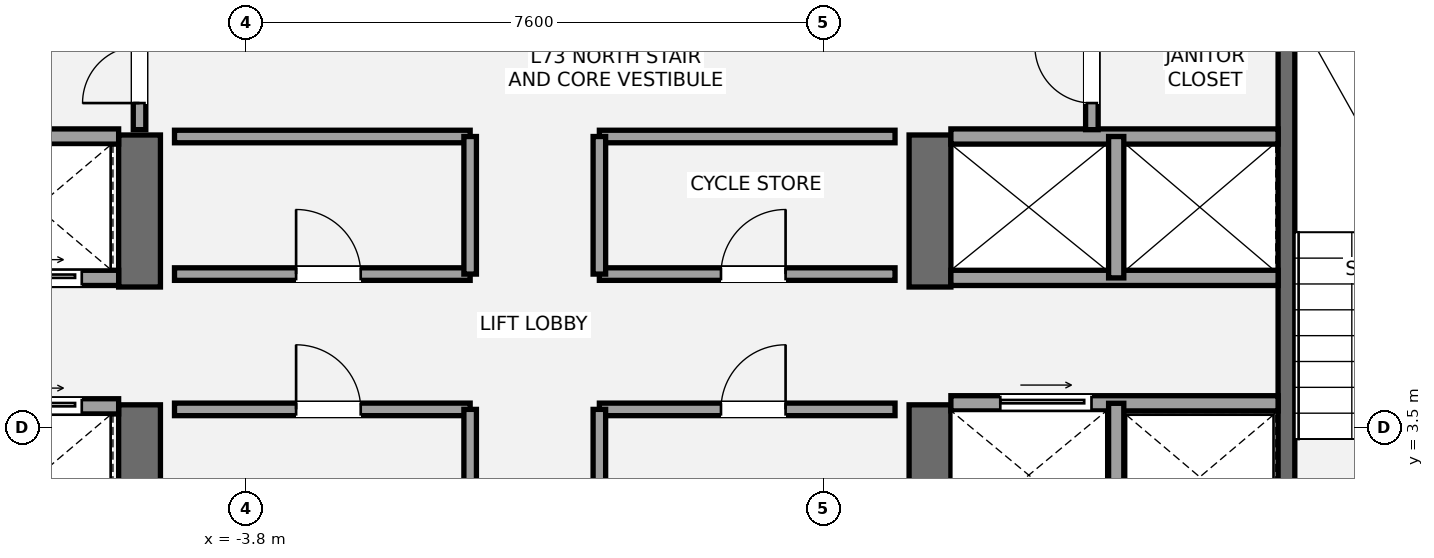
"""IFC4 building model, lengths in metres.
Left out: names, types, materials, properties, quantities, classifications, styles, units other than length and angle.
Written with IfcOpenShell. Run it as: python <this file> out.ifc"""

import sys

from ifc_helpers import new_model, si_unit, direction, frame, frame_2d, origin, place, context, subcontext, project, spatial, rectangle, extrude, element, fill, save


model = new_model("IFC4")
c1 = context("Model", 3, precision=1e-05, world=origin(), true_north=direction((0.0, 1.0)))
c2 = subcontext(c1, "Body", "Model", "MODEL_VIEW")
j1 = project(units=[si_unit("LENGTHUNIT", "METRE"), si_unit("PLANEANGLEUNIT", "RADIAN")], contexts=[c1])
p1 = place(None, origin())
s1 = spatial("IfcSite", under=j1, at=p1, CompositionType="ELEMENT")
p2 = place(p1, origin())
s2 = spatial("IfcBuilding", under=s1, at=p2, CompositionType="ELEMENT")
p3 = place(p2, frame((0.0, 0.0, 257.25)))
s3 = spatial("IfcBuildingStorey", under=s2, at=p3, CompositionType="ELEMENT", Elevation=257.25)
p4 = place(p3, frame((-5.2, 1.3, 0.0), z_axis=(0.0, 0.0, 1.0), x_axis=(0.0, 1.0, 0.0)))
e1 = element("IfcWall", 1, at=p4, inside=s3, PredefinedType="SHEAR", context=c2, shape_type="SweptSolid", body=[
    extrude(rectangle(XDim=2.5, YDim=0.55, at=frame_2d((1.25, 0.0))), origin(), (0.0, 0.0, 1.0), 3.15),
])
p5 = place(p3, frame((-5.2, 5.35, 0.0), z_axis=(0.0, 0.0, 1.0), x_axis=(0.0, 1.0, 0.0)))
e2 = element("IfcWall", 2, at=p5, inside=s3, PredefinedType="SHEAR", context=c2, shape_type="SweptSolid", body=[
    extrude(rectangle(XDim=2.0, YDim=0.55, at=frame_2d((1.0, 0.0))), origin(), (0.0, 0.0, 1.0), 3.15),
])
p6 = place(p3, frame((5.2, 1.3, 0.0), z_axis=(0.0, 0.0, 1.0), x_axis=(0.0, 1.0, 0.0)))
e3 = element("IfcWall", 3, at=p6, inside=s3, PredefinedType="SHEAR", context=c2, shape_type="SweptSolid", body=[
    extrude(rectangle(XDim=2.5, YDim=0.55, at=frame_2d((1.25, 0.0))), origin(), (0.0, 0.0, 1.0), 3.15),
])
p7 = place(p3, frame((5.2, 5.35, 0.0), z_axis=(0.0, 0.0, 1.0), x_axis=(0.0, 1.0, 0.0)))
e4 = element("IfcWall", 4, at=p7, inside=s3, PredefinedType="SHEAR", context=c2, shape_type="SweptSolid", body=[
    extrude(rectangle(XDim=2.0, YDim=0.55, at=frame_2d((1.0, 0.0))), origin(), (0.0, 0.0, 1.0), 3.15),
])
p8 = place(p3, frame((9.89, 1.85, 0.0), z_axis=(0.0, 0.0, 1.0), x_axis=(0.0, 1.0, 0.0)))
e5 = element("IfcWall", 5, at=p8, inside=s3, PredefinedType="SHEAR", context=c2, shape_type="SweptSolid", body=[
    extrude(rectangle(XDim=7.15, YDim=0.22, at=frame_2d((3.575, 0.0))), origin(), (0.0, 0.0, 1.0), 3.15),
])
p9 = place(p3, frame((-9.78, 3.78, 0.0), z_axis=(0.0, 0.0, 1.0), x_axis=(1.0, 0.0, 0.0)))
e6 = element("IfcWall", 6, at=p9, inside=s3, PredefinedType="SOLIDWALL", context=c2, shape_type="SweptSolid", body=[
    extrude(rectangle(XDim=4.305, YDim=0.2, at=frame_2d((2.152, 0.0))), origin(), (0.0, 0.0, 1.0), 2.93),
])
p10 = place(p9, frame((2.72, 0.0, 0.0)))
e7 = element("IfcOpeningElement", 7, at=p10, cuts=e6, PredefinedType="OPENING", context=c2, shape_type="SweptSolid", body=[
    extrude(rectangle(XDim=1.1, YDim=2.2, at=frame_2d((0.55, 1.1))), frame((0.0, 0.11, 0.0), z_axis=(0.0, -1.0, 0.0), x_axis=(1.0, 0.0, 0.0)), (0.0, 0.0, 1.0), 0.22),
])
p11 = place(p3, frame((-9.78, 5.47, 0.0), z_axis=(0.0, 0.0, 1.0), x_axis=(1.0, 0.0, 0.0)))
e8 = element("IfcWall", 8, at=p11, inside=s3, PredefinedType="SOLIDWALL", context=c2, shape_type="SweptSolid", body=[
    extrude(rectangle(XDim=4.305, YDim=0.2, at=frame_2d((2.152, 0.0))), origin(), (0.0, 0.0, 1.0), 2.93),
])
p12 = place(p11, frame((0.55, 0.0, 0.0)))
e9 = element("IfcOpeningElement", 9, at=p12, cuts=e8, PredefinedType="OPENING", context=c2, shape_type="SweptSolid", body=[
    extrude(rectangle(XDim=1.1, YDim=2.2, at=frame_2d((0.55, 1.1))), frame((0.0, 0.11, 0.0), z_axis=(0.0, -1.0, 0.0), x_axis=(1.0, 0.0, 0.0)), (0.0, 0.0, 1.0), 0.22),
])
p13 = place(p11, frame((2.72, 0.0, 0.0)))
e10 = element("IfcOpeningElement", 10, at=p13, cuts=e8, PredefinedType="OPENING", context=c2, shape_type="SweptSolid", body=[
    extrude(rectangle(XDim=1.1, YDim=2.2, at=frame_2d((0.55, 1.1))), frame((0.0, 0.11, 0.0), z_axis=(0.0, -1.0, 0.0), x_axis=(1.0, 0.0, 0.0)), (0.0, 0.0, 1.0), 0.22),
])
p14 = place(p3, frame((-9.78, 7.33, 0.0), z_axis=(0.0, 0.0, 1.0), x_axis=(1.0, 0.0, 0.0)))
e11 = element("IfcWall", 11, at=p14, inside=s3, PredefinedType="SOLIDWALL", context=c2, shape_type="SweptSolid", body=[
    extrude(rectangle(XDim=4.305, YDim=0.2, at=frame_2d((2.152, 0.0))), origin(), (0.0, 0.0, 1.0), 2.93),
])
p15 = place(p3, frame((5.475, 3.82, 0.0), z_axis=(0.0, 0.0, 1.0), x_axis=(1.0, 0.0, 0.0)))
e12 = element("IfcWall", 12, at=p15, inside=s3, PredefinedType="SOLIDWALL", context=c2, shape_type="SweptSolid", body=[
    extrude(rectangle(XDim=4.305, YDim=0.2, at=frame_2d((2.152, 0.0))), origin(), (0.0, 0.0, 1.0), 2.93),
])
p16 = place(p15, frame((0.65, 0.0, 0.0)))
e13 = element("IfcOpeningElement", 13, at=p16, cuts=e12, PredefinedType="OPENING", context=c2, shape_type="SweptSolid", body=[
    extrude(rectangle(XDim=1.2, YDim=2.2, at=frame_2d((0.6, 1.1))), frame((0.0, 0.11, 0.0), z_axis=(0.0, -1.0, 0.0), x_axis=(1.0, 0.0, 0.0)), (0.0, 0.0, 1.0), 0.22),
])
p17 = place(p3, frame((7.65, 1.85, 0.0), z_axis=(0.0, 0.0, 1.0), x_axis=(0.0, 1.0, 0.0)))
e14 = element("IfcWall", 14, at=p17, inside=s3, PredefinedType="SOLIDWALL", context=c2, shape_type="SweptSolid", body=[
    extrude(rectangle(XDim=1.97, YDim=0.2, at=frame_2d((0.985, 0.0))), origin(), (0.0, 0.0, 1.0), 2.93),
])
for number, where, z_axis, x_axis in (
    (15, (5.475, 5.47, 0.0), (0.0, 0.0, 1.0), (1.0, 0.0, 0.0)),
    (16, (5.475, 7.33, 0.0), (0.0, 0.0, 1.0), (1.0, 0.0, 0.0)),
):
    element("IfcWall", number, at=place(p3, frame(where, z_axis=z_axis, x_axis=x_axis)), inside=s3, PredefinedType="SOLIDWALL", context=c2, shape_type="SweptSolid", body=[
        extrude(rectangle(XDim=4.305, YDim=0.2, at=frame_2d((2.152, 0.0))), origin(), (0.0, 0.0, 1.0), 2.93),
    ])
p18 = place(p3, frame((7.65, 5.47, 0.0), z_axis=(0.0, 0.0, 1.0), x_axis=(0.0, 1.0, 0.0)))
e17 = element("IfcWall", 17, at=p18, inside=s3, PredefinedType="SOLIDWALL", context=c2, shape_type="SweptSolid", body=[
    extrude(rectangle(XDim=1.86, YDim=0.2, at=frame_2d((0.93, 0.0))), origin(), (0.0, 0.0, 1.0), 2.93),
])
p19 = place(p3, frame((-4.74, 3.74, 0.0), z_axis=(0.0, 0.0, 1.0), x_axis=(1.0, 0.0, 0.0)))
e18 = element("IfcWall", 18, at=p19, inside=s3, PredefinedType="PARTITIONING", context=c2, shape_type="SweptSolid", body=[
    extrude(rectangle(XDim=3.89, YDim=0.165, at=frame_2d((1.945, 0.0))), origin(), (0.0, 0.0, 1.0), 2.93),
])
p20 = place(p19, frame((1.6, 0.0, 0.0)))
e19 = element("IfcOpeningElement", 19, at=p20, cuts=e18, PredefinedType="OPENING", context=c2, shape_type="SweptSolid", body=[
    extrude(rectangle(XDim=0.85, YDim=2.1, at=frame_2d((0.425, 1.05))), frame((0.0, 0.093, 0.0), z_axis=(0.0, -1.0, 0.0), x_axis=(1.0, 0.0, 0.0)), (0.0, 0.0, 1.0), 0.185),
])
p21 = place(p3, frame((-0.85, 1.92, 0.0), z_axis=(0.0, 0.0, 1.0), x_axis=(0.0, 1.0, 0.0)))
e20 = element("IfcWall", 20, at=p21, inside=s3, PredefinedType="PARTITIONING", context=c2, shape_type="SweptSolid", body=[
    extrude(rectangle(XDim=1.82, YDim=0.165, at=frame_2d((0.91, 0.0))), origin(), (0.0, 0.0, 1.0), 2.93),
])
p22 = place(p3, frame((0.85, 3.74, 0.0), z_axis=(0.0, 0.0, 1.0), x_axis=(1.0, 0.0, 0.0)))
e21 = element("IfcWall", 21, at=p22, inside=s3, PredefinedType="PARTITIONING", context=c2, shape_type="SweptSolid", body=[
    extrude(rectangle(XDim=3.89, YDim=0.165, at=frame_2d((1.945, 0.0))), origin(), (0.0, 0.0, 1.0), 2.93),
])
p23 = place(p22, frame((1.6, 0.0, 0.0)))
e22 = element("IfcOpeningElement", 22, at=p23, cuts=e21, PredefinedType="OPENING", context=c2, shape_type="SweptSolid", body=[
    extrude(rectangle(XDim=0.85, YDim=2.1, at=frame_2d((0.425, 1.05))), frame((0.0, 0.093, 0.0), z_axis=(0.0, -1.0, 0.0), x_axis=(1.0, 0.0, 0.0)), (0.0, 0.0, 1.0), 0.185),
])
p24 = place(p3, frame((0.85, 1.92, 0.0), z_axis=(0.0, 0.0, 1.0), x_axis=(0.0, 1.0, 0.0)))
e23 = element("IfcWall", 23, at=p24, inside=s3, PredefinedType="PARTITIONING", context=c2, shape_type="SweptSolid", body=[
    extrude(rectangle(XDim=1.82, YDim=0.165, at=frame_2d((0.91, 0.0))), origin(), (0.0, 0.0, 1.0), 2.93),
])
p25 = place(p3, frame((-4.74, 5.52, 0.0), z_axis=(0.0, 0.0, 1.0), x_axis=(1.0, 0.0, 0.0)))
e24 = element("IfcWall", 24, at=p25, inside=s3, PredefinedType="PARTITIONING", context=c2, shape_type="SweptSolid", body=[
    extrude(rectangle(XDim=3.89, YDim=0.165, at=frame_2d((1.945, 0.0))), origin(), (0.0, 0.0, 1.0), 2.93),
])
p26 = place(p25, frame((1.6, 0.0, 0.0)))
e25 = element("IfcOpeningElement", 25, at=p26, cuts=e24, PredefinedType="OPENING", context=c2, shape_type="SweptSolid", body=[
    extrude(rectangle(XDim=0.85, YDim=2.1, at=frame_2d((0.425, 1.05))), frame((0.0, 0.093, 0.0), z_axis=(0.0, -1.0, 0.0), x_axis=(1.0, 0.0, 0.0)), (0.0, 0.0, 1.0), 0.185),
])
p27 = place(p3, frame((-4.74, 7.33, 0.0), z_axis=(0.0, 0.0, 1.0), x_axis=(1.0, 0.0, 0.0)))
e26 = element("IfcWall", 26, at=p27, inside=s3, PredefinedType="PARTITIONING", context=c2, shape_type="SweptSolid", body=[
    extrude(rectangle(XDim=3.89, YDim=0.165, at=frame_2d((1.945, 0.0))), origin(), (0.0, 0.0, 1.0), 2.93),
])
p28 = place(p3, frame((-0.85, 5.52, 0.0), z_axis=(0.0, 0.0, 1.0), x_axis=(0.0, 1.0, 0.0)))
e27 = element("IfcWall", 27, at=p28, inside=s3, PredefinedType="PARTITIONING", context=c2, shape_type="SweptSolid", body=[
    extrude(rectangle(XDim=1.81, YDim=0.165, at=frame_2d((0.905, 0.0))), origin(), (0.0, 0.0, 1.0), 2.93),
])
p29 = place(p3, frame((0.85, 5.52, 0.0), z_axis=(0.0, 0.0, 1.0), x_axis=(1.0, 0.0, 0.0)))
e28 = element("IfcWall", 28, at=p29, inside=s3, PredefinedType="PARTITIONING", context=c2, shape_type="SweptSolid", body=[
    extrude(rectangle(XDim=3.89, YDim=0.165, at=frame_2d((1.945, 0.0))), origin(), (0.0, 0.0, 1.0), 2.93),
])
p30 = place(p29, frame((1.6, 0.0, 0.0)))
e29 = element("IfcOpeningElement", 29, at=p30, cuts=e28, PredefinedType="OPENING", context=c2, shape_type="SweptSolid", body=[
    extrude(rectangle(XDim=0.85, YDim=2.1, at=frame_2d((0.425, 1.05))), frame((0.0, 0.093, 0.0), z_axis=(0.0, -1.0, 0.0), x_axis=(1.0, 0.0, 0.0)), (0.0, 0.0, 1.0), 0.185),
])
p31 = place(p3, frame((0.85, 7.33, 0.0), z_axis=(0.0, 0.0, 1.0), x_axis=(1.0, 0.0, 0.0)))
e30 = element("IfcWall", 30, at=p31, inside=s3, PredefinedType="PARTITIONING", context=c2, shape_type="SweptSolid", body=[
    extrude(rectangle(XDim=3.89, YDim=0.165, at=frame_2d((1.945, 0.0))), origin(), (0.0, 0.0, 1.0), 2.93),
])
p32 = place(p3, frame((0.85, 5.52, 0.0), z_axis=(0.0, 0.0, 1.0), x_axis=(0.0, 1.0, 0.0)))
e31 = element("IfcWall", 31, at=p32, inside=s3, PredefinedType="PARTITIONING", context=c2, shape_type="SweptSolid", body=[
    extrude(rectangle(XDim=1.81, YDim=0.165, at=frame_2d((0.905, 0.0))), origin(), (0.0, 0.0, 1.0), 2.93),
])
p33 = place(p3, frame((-5.2, 7.42, 0.0), z_axis=(0.0, 0.0, 1.0), x_axis=(0.0, 1.0, 0.0)))
e32 = element("IfcWall", 32, at=p33, inside=s3, PredefinedType="PARTITIONING", context=c2, shape_type="SweptSolid", body=[
    extrude(rectangle(XDim=1.58, YDim=0.165, at=frame_2d((0.79, 0.0))), origin(), (0.0, 0.0, 1.0), 2.93),
])
p34 = place(p33, frame((0.35, 0.0, 0.0)))
e33 = element("IfcOpeningElement", 33, at=p34, cuts=e32, PredefinedType="OPENING", context=c2, shape_type="SweptSolid", body=[
    extrude(rectangle(XDim=0.75, YDim=2.1, at=frame_2d((0.375, 1.05))), frame((0.0, 0.093, 0.0), z_axis=(0.0, -1.0, 0.0), x_axis=(1.0, 0.0, 0.0)), (0.0, 0.0, 1.0), 0.185),
])
p35 = place(p3, frame((7.33, 7.42, 0.0), z_axis=(0.0, 0.0, 1.0), x_axis=(0.0, 1.0, 0.0)))
e34 = element("IfcWall", 34, at=p35, inside=s3, PredefinedType="PARTITIONING", context=c2, shape_type="SweptSolid", body=[
    extrude(rectangle(XDim=1.58, YDim=0.165, at=frame_2d((0.79, 0.0))), origin(), (0.0, 0.0, 1.0), 2.93),
])
p36 = place(p35, frame((0.35, 0.0, 0.0)))
e35 = element("IfcOpeningElement", 35, at=p36, cuts=e34, PredefinedType="OPENING", context=c2, shape_type="SweptSolid", body=[
    extrude(rectangle(XDim=0.75, YDim=2.1, at=frame_2d((0.375, 1.05))), frame((0.0, 0.093, 0.0), z_axis=(0.0, -1.0, 0.0), x_axis=(1.0, 0.0, 0.0)), (0.0, 0.0, 1.0), 0.185),
])
p37 = place(p13, origin())
e36 = element("IfcDoor", 36, at=p37, inside=s3, OperationType="SLIDING_TO_LEFT", PredefinedType="DOOR", context=c2, shape_type="SweptSolid", body=[
    extrude(rectangle(XDim=1.1, YDim=2.2, at=frame_2d((0.55, 1.1))), frame((0.0, 0.025, 0.0), z_axis=(0.0, -1.0, 0.0), x_axis=(1.0, 0.0, 0.0)), (0.0, 0.0, 1.0), 0.05),
])
fill(e10, e36)
p38 = place(p10, origin())
e37 = element("IfcDoor", 37, at=p38, inside=s3, OperationType="SLIDING_TO_LEFT", PredefinedType="DOOR", context=c2, shape_type="SweptSolid", body=[
    extrude(rectangle(XDim=1.1, YDim=2.2, at=frame_2d((0.55, 1.1))), frame((0.0, 0.025, 0.0), z_axis=(0.0, -1.0, 0.0), x_axis=(1.0, 0.0, 0.0)), (0.0, 0.0, 1.0), 0.05),
])
fill(e7, e37)
p39 = place(p16, origin())
e38 = element("IfcDoor", 38, at=p39, inside=s3, OperationType="SLIDING_TO_RIGHT", PredefinedType="DOOR", context=c2, shape_type="SweptSolid", body=[
    extrude(rectangle(XDim=1.2, YDim=2.2, at=frame_2d((0.6, 1.1))), frame((0.0, 0.025, 0.0), z_axis=(0.0, -1.0, 0.0), x_axis=(1.0, 0.0, 0.0)), (0.0, 0.0, 1.0), 0.05),
])
fill(e13, e38)
p40 = place(p20, origin())
e39 = element("IfcDoor", 39, at=p40, inside=s3, OperationType="SINGLE_SWING_LEFT", PredefinedType="DOOR", context=c2, shape_type="SweptSolid", body=[
    extrude(rectangle(XDim=0.85, YDim=2.1, at=frame_2d((0.425, 1.05))), frame((0.0, 0.025, 0.0), z_axis=(0.0, -1.0, 0.0), x_axis=(1.0, 0.0, 0.0)), (0.0, 0.0, 1.0), 0.05),
])
fill(e19, e39)
p41 = place(p23, origin())
e40 = element("IfcDoor", 40, at=p41, inside=s3, OperationType="SINGLE_SWING_RIGHT", PredefinedType="DOOR", context=c2, shape_type="SweptSolid", body=[
    extrude(rectangle(XDim=0.85, YDim=2.1, at=frame_2d((0.425, 1.05))), frame((0.0, 0.025, 0.0), z_axis=(0.0, -1.0, 0.0), x_axis=(1.0, 0.0, 0.0)), (0.0, 0.0, 1.0), 0.05),
])
fill(e22, e40)
p42 = place(p26, origin())
e41 = element("IfcDoor", 41, at=p42, inside=s3, OperationType="SINGLE_SWING_LEFT", PredefinedType="DOOR", context=c2, shape_type="SweptSolid", body=[
    extrude(rectangle(XDim=0.85, YDim=2.1, at=frame_2d((0.425, 1.05))), frame((0.0, 0.025, 0.0), z_axis=(0.0, -1.0, 0.0), x_axis=(1.0, 0.0, 0.0)), (0.0, 0.0, 1.0), 0.05),
])
fill(e25, e41)
p43 = place(p30, origin())
e42 = element("IfcDoor", 42, at=p43, inside=s3, OperationType="SINGLE_SWING_RIGHT", PredefinedType="DOOR", context=c2, shape_type="SweptSolid", body=[
    extrude(rectangle(XDim=0.85, YDim=2.1, at=frame_2d((0.425, 1.05))), frame((0.0, 0.025, 0.0), z_axis=(0.0, -1.0, 0.0), x_axis=(1.0, 0.0, 0.0)), (0.0, 0.0, 1.0), 0.05),
])
fill(e29, e42)
p44 = place(p34, origin())
e43 = element("IfcDoor", 43, at=p44, inside=s3, OperationType="SINGLE_SWING_LEFT", PredefinedType="DOOR", context=c2, shape_type="SweptSolid", body=[
    extrude(rectangle(XDim=0.75, YDim=2.1, at=frame_2d((0.375, 1.05))), frame((0.0, 0.025, 0.0), z_axis=(0.0, -1.0, 0.0), x_axis=(1.0, 0.0, 0.0)), (0.0, 0.0, 1.0), 0.05),
])
fill(e33, e43)
p45 = place(p36, origin())
e44 = element("IfcDoor", 44, at=p45, inside=s3, OperationType="SINGLE_SWING_RIGHT", PredefinedType="DOOR", context=c2, shape_type="SweptSolid", body=[
    extrude(rectangle(XDim=0.75, YDim=2.1, at=frame_2d((0.375, 1.05))), frame((0.0, 0.025, 0.0), z_axis=(0.0, -1.0, 0.0), x_axis=(1.0, 0.0, 0.0)), (0.0, 0.0, 1.0), 0.05),
])
fill(e35, e44)
save(model, sys.argv[1])
